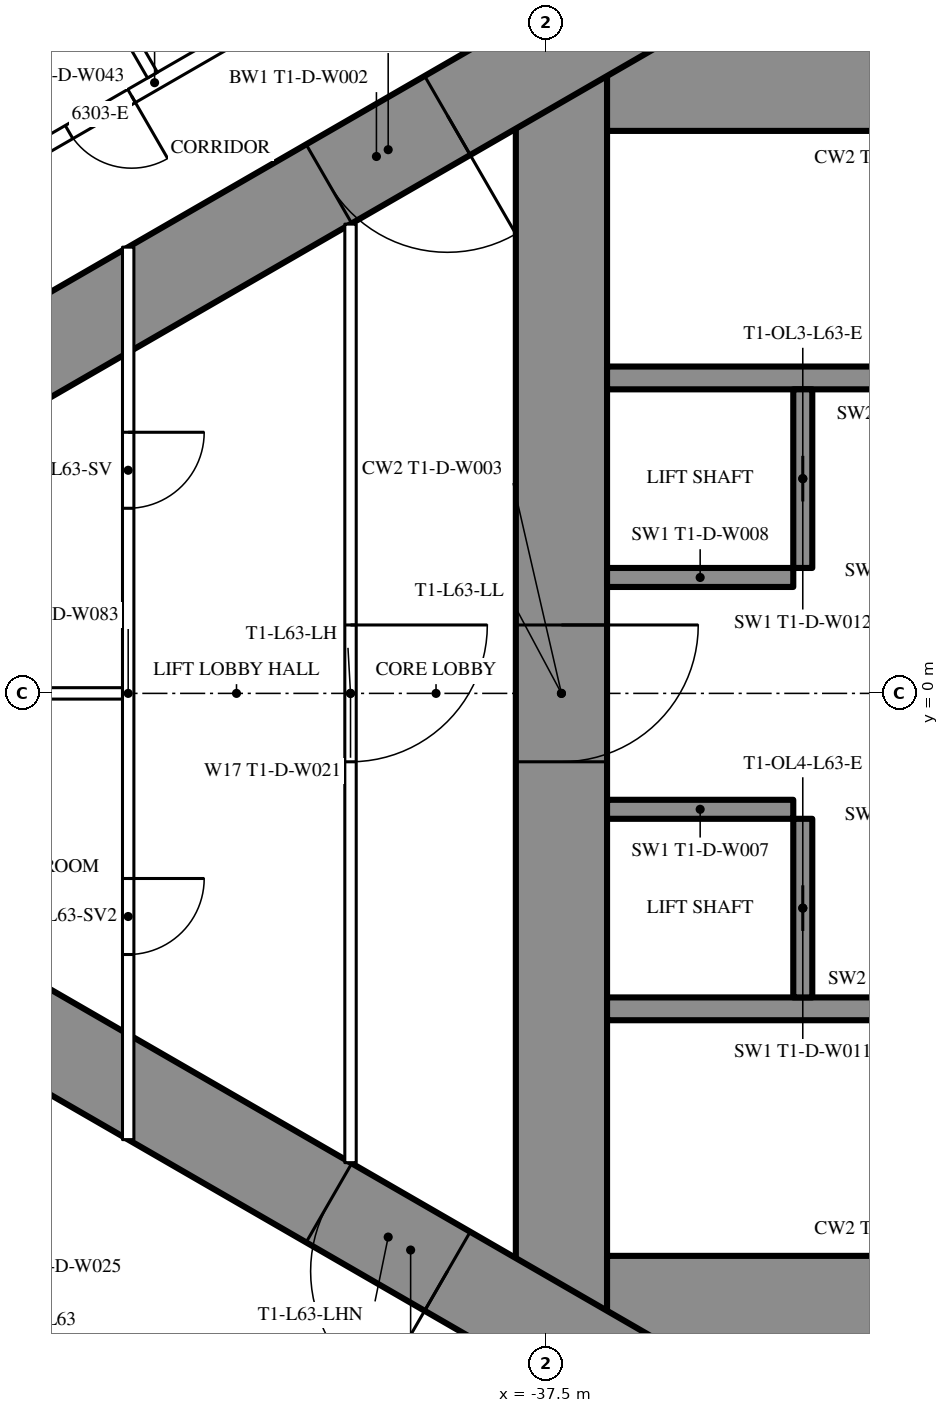
"""IFC4 building model, lengths in metres.
Left out: names, types, materials, properties, quantities, classifications, styles, units other than length and angle.
Written with IfcOpenShell. Run it as: python <this file> out.ifc"""

import sys

from ifc_helpers import new_model, si_unit, direction, frame, frame_2d, origin, place, context, subcontext, project, spatial, rectangle, extrude, element, fill, save


model = new_model("IFC4")
c1 = context("Model", 3, precision=1e-05, world=origin(), true_north=direction((0.0, 1.0)))
c2 = subcontext(c1, "Body", "Model", "MODEL_VIEW")
j1 = project(units=[si_unit("LENGTHUNIT", "METRE"), si_unit("PLANEANGLEUNIT", "RADIAN")], contexts=[c1])
p1 = place(None, origin())
s1 = spatial("IfcSite", under=j1, at=p1, CompositionType="ELEMENT")
p2 = place(p1, origin())
s2 = spatial("IfcBuilding", under=s1, at=p2, CompositionType="ELEMENT")
p3 = place(p2, frame((0.0, 0.0, 236.9)))
s3 = spatial("IfcBuildingStorey", under=s2, at=p3, CompositionType="ELEMENT", Elevation=236.9)
p4 = place(p3, frame((-37.3, 8.6, 0.0), z_axis=(0.0, 0.0, 1.0), x_axis=(0.0, -1.0, 0.0)))
e1 = element("IfcWall", 1, at=p4, inside=s3, PredefinedType="SHEAR", context=c2, shape_type="SweptSolid", body=[
    extrude(rectangle(XDim=17.2, YDim=1.2, at=frame_2d((8.6, 0.0))), origin(), (0.0, 0.0, 1.0), 3.6),
])
p5 = place(p4, frame((7.7, 0.0, 0.0)))
e2 = element("IfcOpeningElement", 2, at=p5, cuts=e1, PredefinedType="OPENING", context=c2, shape_type="SweptSolid", body=[
    extrude(rectangle(XDim=1.8, YDim=2.2, at=frame_2d((0.9, 1.1))), frame((0.0, 0.61, 0.0), z_axis=(0.0, -1.0, 0.0), x_axis=(1.0, 0.0, 0.0)), (0.0, 0.0, 1.0), 1.22),
])
p6 = place(p3, frame((-28.3, 8.0, 0.0), z_axis=(0.0, 0.0, 1.0), x_axis=(-1.0, 0.0, 0.0)))
e3 = element("IfcWall", 3, at=p6, inside=s3, PredefinedType="SHEAR", context=c2, shape_type="SweptSolid", body=[
    extrude(rectangle(XDim=8.4, YDim=1.2, at=frame_2d((4.2, 0.0))), origin(), (0.0, 0.0, 1.0), 3.6),
])
p7 = place(p6, frame((0.25, 0.0, 0.0)))
e4 = element("IfcOpeningElement", 4, at=p7, cuts=e3, PredefinedType="OPENING", context=c2, shape_type="SweptSolid", body=[
    extrude(rectangle(XDim=1.0, YDim=2.2, at=frame_2d((0.5, 1.1))), frame((0.0, 0.61, 0.0), z_axis=(0.0, -1.0, 0.0), x_axis=(1.0, 0.0, 0.0)), (0.0, 0.0, 1.0), 1.22),
])
p8 = place(p3, frame((-28.3, -8.0, 0.0), z_axis=(0.0, 0.0, 1.0), x_axis=(-1.0, 0.0, 0.0)))
e5 = element("IfcWall", 5, at=p8, inside=s3, PredefinedType="SHEAR", context=c2, shape_type="SweptSolid", body=[
    extrude(rectangle(XDim=8.4, YDim=1.2, at=frame_2d((4.2, 0.0))), origin(), (0.0, 0.0, 1.0), 3.6),
])
p9 = place(p8, frame((0.25, 0.0, 0.0)))
e6 = element("IfcOpeningElement", 6, at=p9, cuts=e5, PredefinedType="OPENING", context=c2, shape_type="SweptSolid", body=[
    extrude(rectangle(XDim=1.0, YDim=2.2, at=frame_2d((0.5, 1.1))), frame((0.0, 0.61, 0.0), z_axis=(0.0, -1.0, 0.0), x_axis=(1.0, 0.0, 0.0)), (0.0, 0.0, 1.0), 1.22),
])
for number, where, z_axis, x_axis in (
    (7, (-28.3, 4.15, 0.0), (0.0, 0.0, 1.0), (-1.0, 0.0, 0.0)),
    (8, (-28.3, -4.15, 0.0), (0.0, 0.0, 1.0), (-1.0, 0.0, 0.0)),
):
    element("IfcWall", number, at=place(p3, frame(where, z_axis=z_axis, x_axis=x_axis)), inside=s3, PredefinedType="SHEAR", context=c2, shape_type="SweptSolid", body=[
        extrude(rectangle(XDim=8.4, YDim=0.3, at=frame_2d((4.2, 0.0))), origin(), (0.0, 0.0, 1.0), 3.6),
    ])
p10 = place(p3, frame((-34.125, 4.0, 0.0), z_axis=(0.0, 0.0, 1.0), x_axis=(0.0, -1.0, 0.0)))
e9 = element("IfcWall", 9, at=p10, inside=s3, PredefinedType="SHEAR", context=c2, shape_type="SweptSolid", body=[
    extrude(rectangle(XDim=2.35, YDim=0.25, at=frame_2d((1.175, 0.0))), origin(), (0.0, 0.0, 1.0), 3.6),
])
p11 = place(p10, frame((0.875, 0.0, 0.0)))
e10 = element("IfcOpeningElement", 10, at=p11, cuts=e9, PredefinedType="OPENING", context=c2, shape_type="SweptSolid", body=[
    extrude(rectangle(XDim=0.6, YDim=2.0, at=frame_2d((0.3, 1.0))), frame((0.0, 0.135, 0.0), z_axis=(0.0, -1.0, 0.0), x_axis=(1.0, 0.0, 0.0)), (0.0, 0.0, 1.0), 0.27),
])
p12 = place(p3, frame((-34.25, 1.525, 0.0), z_axis=(0.0, 0.0, 1.0), x_axis=(-1.0, 0.0, 0.0)))
e11 = element("IfcWall", 11, at=p12, inside=s3, PredefinedType="SHEAR", context=c2, shape_type="SweptSolid", body=[
    extrude(rectangle(XDim=2.45, YDim=0.25, at=frame_2d((1.225, 0.0))), origin(), (0.0, 0.0, 1.0), 3.6),
])
p13 = place(p3, frame((-34.125, -1.65, 0.0), z_axis=(0.0, 0.0, 1.0), x_axis=(0.0, -1.0, 0.0)))
e12 = element("IfcWall", 12, at=p13, inside=s3, PredefinedType="SHEAR", context=c2, shape_type="SweptSolid", body=[
    extrude(rectangle(XDim=2.35, YDim=0.25, at=frame_2d((1.175, 0.0))), origin(), (0.0, 0.0, 1.0), 3.6),
])
p14 = place(p13, frame((0.875, 0.0, 0.0)))
e13 = element("IfcOpeningElement", 13, at=p14, cuts=e12, PredefinedType="OPENING", context=c2, shape_type="SweptSolid", body=[
    extrude(rectangle(XDim=0.6, YDim=2.0, at=frame_2d((0.3, 1.0))), frame((0.0, 0.135, 0.0), z_axis=(0.0, -1.0, 0.0), x_axis=(1.0, 0.0, 0.0)), (0.0, 0.0, 1.0), 0.27),
])
p15 = place(p3, frame((-34.25, -1.525, 0.0), z_axis=(0.0, 0.0, 1.0), x_axis=(-1.0, 0.0, 0.0)))
e14 = element("IfcWall", 14, at=p15, inside=s3, PredefinedType="SHEAR", context=c2, shape_type="SweptSolid", body=[
    extrude(rectangle(XDim=2.45, YDim=0.25, at=frame_2d((1.225, 0.0))), origin(), (0.0, 0.0, 1.0), 3.6),
])
p16 = place(p3, frame((-27.2, 14.3, 0.0), z_axis=(0.0, 0.0, 1.0), x_axis=(-0.866026593062, -0.499997940104, 0.0)))
e15 = element("IfcWall", 15, at=p16, inside=s3, PredefinedType="SHEAR", context=c2, shape_type="SweptSolid", body=[
    extrude(rectangle(XDim=28.946, YDim=1.2, at=frame_2d((14.473, 0.0))), origin(), (0.0, 0.0, 1.0), 3.6),
])
p17 = place(p16, frame((4.6, 0.0, 0.0)))
e16 = element("IfcOpeningElement", 16, at=p17, cuts=e15, PredefinedType="OPENING", context=c2, shape_type="SweptSolid", body=[
    extrude(rectangle(XDim=1.0, YDim=2.2, at=frame_2d((0.5, 1.1))), frame((0.0, 0.61, 0.0), z_axis=(0.0, -1.0, 0.0), x_axis=(1.0, 0.0, 0.0)), (0.0, 0.0, 1.0), 1.22),
])
p18 = place(p16, frame((13.395, 0.0, 0.0)))
e17 = element("IfcOpeningElement", 17, at=p18, cuts=e15, PredefinedType="OPENING", context=c2, shape_type="SweptSolid", body=[
    extrude(rectangle(XDim=1.8, YDim=2.2, at=frame_2d((0.9, 1.1))), frame((0.0, 0.61, 0.0), z_axis=(0.0, -1.0, 0.0), x_axis=(1.0, 0.0, 0.0)), (0.0, 0.0, 1.0), 1.22),
])
p19 = place(p3, frame((-27.2, -14.3, 0.0), z_axis=(0.0, 0.0, 1.0), x_axis=(-0.866024021859, 0.500002393557, 0.0)))
e18 = element("IfcWall", 18, at=p19, inside=s3, PredefinedType="SHEAR", context=c2, shape_type="SweptSolid", body=[
    extrude(rectangle(XDim=27.907, YDim=1.2, at=frame_2d((13.954, 0.0))), origin(), (0.0, 0.0, 1.0), 3.6),
])
p20 = place(p19, frame((4.6, 0.0, 0.0)))
e19 = element("IfcOpeningElement", 19, at=p20, cuts=e18, PredefinedType="OPENING", context=c2, shape_type="SweptSolid", body=[
    extrude(rectangle(XDim=1.0, YDim=2.2, at=frame_2d((0.5, 1.1))), frame((0.0, 0.61, 0.0), z_axis=(0.0, -1.0, 0.0), x_axis=(1.0, 0.0, 0.0)), (0.0, 0.0, 1.0), 1.22),
])
p21 = place(p19, frame((13.395, 0.0, 0.0)))
e20 = element("IfcOpeningElement", 20, at=p21, cuts=e18, PredefinedType="OPENING", context=c2, shape_type="SweptSolid", body=[
    extrude(rectangle(XDim=1.8, YDim=2.2, at=frame_2d((0.9, 1.1))), frame((0.0, 0.61, 0.0), z_axis=(0.0, -1.0, 0.0), x_axis=(1.0, 0.0, 0.0)), (0.0, 0.0, 1.0), 1.22),
])
p22 = place(p3, frame((-28.737, 16.068, 0.0), z_axis=(0.0, 0.0, 1.0), x_axis=(-0.866026057212, -0.499998868229, 0.0)))
e21 = element("IfcWall", 21, at=p22, inside=s3, PredefinedType="PARTITIONING", context=c2, shape_type="SweptSolid", body=[
    extrude(rectangle(XDim=32.137, YDim=0.2, at=frame_2d((16.068, 0.0))), origin(), (0.0, 0.0, 1.0), 3.35),
])
p23 = place(p22, frame((1.08, 0.0, 0.0)))
e22 = element("IfcOpeningElement", 22, at=p23, cuts=e21, PredefinedType="OPENING", context=c2, shape_type="SweptSolid", body=[
    extrude(rectangle(XDim=1.8, YDim=2.03, at=frame_2d((0.9, 1.015))), frame((0.0, 0.11, 0.0), z_axis=(0.0, -1.0, 0.0), x_axis=(1.0, 0.0, 0.0)), (0.0, 0.0, 1.0), 0.22),
])
p24 = place(p22, frame((6.86, 0.0, 0.0)))
e23 = element("IfcOpeningElement", 23, at=p24, cuts=e21, PredefinedType="OPENING", context=c2, shape_type="SweptSolid", body=[
    extrude(rectangle(XDim=1.0, YDim=2.2, at=frame_2d((0.5, 1.1))), frame((0.0, 0.11, 0.0), z_axis=(0.0, -1.0, 0.0), x_axis=(1.0, 0.0, 0.0)), (0.0, 0.0, 1.0), 0.22),
])
p25 = place(p22, frame((16.418, 0.0, 0.0)))
e24 = element("IfcOpeningElement", 24, at=p25, cuts=e21, PredefinedType="OPENING", context=c2, shape_type="SweptSolid", body=[
    extrude(rectangle(XDim=0.95, YDim=2.2, at=frame_2d((0.475, 1.1))), frame((0.0, 0.11, 0.0), z_axis=(0.0, -1.0, 0.0), x_axis=(1.0, 0.0, 0.0)), (0.0, 0.0, 1.0), 0.22),
])
p26 = place(p22, frame((20.567, 0.0, 0.0)))
e25 = element("IfcOpeningElement", 25, at=p26, cuts=e21, PredefinedType="OPENING", context=c2, shape_type="SweptSolid", body=[
    extrude(rectangle(XDim=0.95, YDim=2.2, at=frame_2d((0.475, 1.1))), frame((0.0, 0.11, 0.0), z_axis=(0.0, -1.0, 0.0), x_axis=(1.0, 0.0, 0.0)), (0.0, 0.0, 1.0), 0.22),
])
p27 = place(p22, frame((27.065, 0.0, 0.0)))
e26 = element("IfcOpeningElement", 26, at=p27, cuts=e21, PredefinedType="OPENING", context=c2, shape_type="SweptSolid", body=[
    extrude(rectangle(XDim=0.95, YDim=2.2, at=frame_2d((0.475, 1.1))), frame((0.0, 0.11, 0.0), z_axis=(0.0, -1.0, 0.0), x_axis=(1.0, 0.0, 0.0)), (0.0, 0.0, 1.0), 0.22),
])
p28 = place(p3, frame((-42.68, 8.134, 0.0), z_axis=(0.0, 0.0, 1.0), x_axis=(-0.499984479505, 0.866034364361, 0.0)))
e27 = element("IfcWall", 27, at=p28, inside=s3, PredefinedType="PARTITIONING", context=c2, shape_type="SweptSolid", body=[
    extrude(rectangle(XDim=5.995, YDim=0.15, at=frame_2d((2.998, 0.0))), origin(), (0.0, 0.0, 1.0), 2.45),
])
p29 = place(p3, frame((-43.445, 9.309, 0.0), z_axis=(0.0, 0.0, 1.0), x_axis=(-0.866031185235, -0.4999899861, 0.0)))
e28 = element("IfcWall", 28, at=p29, inside=s3, PredefinedType="PARTITIONING", context=c2, shape_type="SweptSolid", body=[
    extrude(rectangle(XDim=2.475, YDim=0.15, at=frame_2d((1.238, 0.0))), origin(), (0.0, 0.0, 1.0), 3.35),
])
p30 = place(p3, frame((-40.075, 6.174, 0.0), z_axis=(0.0, 0.0, 1.0), x_axis=(0.0, -1.0, 0.0)))
e29 = element("IfcWall", 29, at=p30, inside=s3, PredefinedType="PARTITIONING", context=c2, shape_type="SweptSolid", body=[
    extrude(rectangle(XDim=12.348, YDim=0.15, at=frame_2d((6.174, 0.0))), origin(), (0.0, 0.0, 1.0), 3.35),
])
p31 = place(p30, frame((5.274, 0.0, 0.0)))
e30 = element("IfcOpeningElement", 30, at=p31, cuts=e29, PredefinedType="OPENING", context=c2, shape_type="SweptSolid", body=[
    extrude(rectangle(XDim=1.8, YDim=2.2, at=frame_2d((0.9, 1.1))), frame((0.0, 0.085, 0.0), z_axis=(0.0, -1.0, 0.0), x_axis=(1.0, 0.0, 0.0)), (0.0, 0.0, 1.0), 0.17),
])
p32 = place(p3, frame((-43.0, 5.871, 0.0), z_axis=(0.0, 0.0, 1.0), x_axis=(0.0, -1.0, 0.0)))
e31 = element("IfcWall", 31, at=p32, inside=s3, PredefinedType="PARTITIONING", context=c2, shape_type="SweptSolid", body=[
    extrude(rectangle(XDim=11.741, YDim=0.15, at=frame_2d((5.871, 0.0))), origin(), (0.0, 0.0, 1.0), 3.35),
])
p33 = place(p32, frame((2.435, 0.0, 0.0)))
e32 = element("IfcOpeningElement", 32, at=p33, cuts=e31, PredefinedType="OPENING", context=c2, shape_type="SweptSolid", body=[
    extrude(rectangle(XDim=1.0, YDim=2.2, at=frame_2d((0.5, 1.1))), frame((0.0, 0.085, 0.0), z_axis=(0.0, -1.0, 0.0), x_axis=(1.0, 0.0, 0.0)), (0.0, 0.0, 1.0), 0.17),
])
p34 = place(p32, frame((8.306, 0.0, 0.0)))
e33 = element("IfcOpeningElement", 33, at=p34, cuts=e31, PredefinedType="OPENING", context=c2, shape_type="SweptSolid", body=[
    extrude(rectangle(XDim=1.0, YDim=2.2, at=frame_2d((0.5, 1.1))), frame((0.0, 0.085, 0.0), z_axis=(0.0, -1.0, 0.0), x_axis=(1.0, 0.0, 0.0)), (0.0, 0.0, 1.0), 0.17),
])
p35 = place(p3, frame((-43.075, 0.0, 0.0), z_axis=(0.0, 0.0, 1.0), x_axis=(-1.0, 0.0, 0.0)))
e34 = element("IfcWall", 34, at=p35, inside=s3, PredefinedType="PARTITIONING", context=c2, shape_type="SweptSolid", body=[
    extrude(rectangle(XDim=10.093, YDim=0.15, at=frame_2d((5.047, 0.0))), origin(), (0.0, 0.0, 1.0), 2.45),
])
p36 = place(p3, frame((-39.758, -11.697, 0.0), z_axis=(0.0, 0.0, 1.0), x_axis=(-0.866024194504, 0.500002094529, 0.0)))
e35 = element("IfcWall", 35, at=p36, inside=s3, PredefinedType="PARTITIONING", context=c2, shape_type="SweptSolid", body=[
    extrude(rectangle(XDim=6.6, YDim=0.25, at=frame_2d((3.3, 0.0))), origin(), (0.0, 0.0, 1.0), 3.35),
])
p37 = place(p36, frame((0.75, 0.0, 0.0)))
e36 = element("IfcOpeningElement", 36, at=p37, cuts=e35, PredefinedType="OPENING", context=c2, shape_type="SweptSolid", body=[
    extrude(rectangle(XDim=1.1, YDim=2.2, at=frame_2d((0.55, 1.1))), frame((0.0, 0.135, 0.0), z_axis=(0.0, -1.0, 0.0), x_axis=(1.0, 0.0, 0.0)), (0.0, 0.0, 1.0), 0.27),
])
p38 = place(p36, frame((2.75, 0.0, 0.0)))
e37 = element("IfcOpeningElement", 37, at=p38, cuts=e35, PredefinedType="OPENING", context=c2, shape_type="SweptSolid", body=[
    extrude(rectangle(XDim=1.1, YDim=2.2, at=frame_2d((0.55, 1.1))), frame((0.0, 0.135, 0.0), z_axis=(0.0, -1.0, 0.0), x_axis=(1.0, 0.0, 0.0)), (0.0, 0.0, 1.0), 0.27),
])
p39 = place(p36, frame((4.75, 0.0, 0.0)))
e38 = element("IfcOpeningElement", 38, at=p39, cuts=e35, PredefinedType="OPENING", context=c2, shape_type="SweptSolid", body=[
    extrude(rectangle(XDim=1.1, YDim=2.2, at=frame_2d((0.55, 1.1))), frame((0.0, 0.135, 0.0), z_axis=(0.0, -1.0, 0.0), x_axis=(1.0, 0.0, 0.0)), (0.0, 0.0, 1.0), 0.27),
])
p40 = place(p25, origin())
e39 = element("IfcDoor", 39, at=p40, inside=s3, OperationType="SINGLE_SWING_LEFT", PredefinedType="DOOR", context=c2, shape_type="SweptSolid", body=[
    extrude(rectangle(XDim=0.95, YDim=2.2, at=frame_2d((0.475, 1.1))), frame((0.0, 0.025, 0.0), z_axis=(0.0, -1.0, 0.0), x_axis=(1.0, 0.0, 0.0)), (0.0, 0.0, 1.0), 0.05),
])
fill(e24, e39)
p41 = place(p31, origin())
e40 = element("IfcDoor", 40, at=p41, inside=s3, OperationType="DOUBLE_DOOR_SINGLE_SWING", PredefinedType="DOOR", context=c2, shape_type="SweptSolid", body=[
    extrude(rectangle(XDim=1.8, YDim=2.2, at=frame_2d((0.9, 1.1))), frame((0.0, 0.025, 0.0), z_axis=(0.0, -1.0, 0.0), x_axis=(1.0, 0.0, 0.0)), (0.0, 0.0, 1.0), 0.05),
])
fill(e30, e40)
p42 = place(p33, origin())
e41 = element("IfcDoor", 41, at=p42, inside=s3, OperationType="SINGLE_SWING_LEFT", PredefinedType="DOOR", context=c2, shape_type="SweptSolid", body=[
    extrude(rectangle(XDim=1.0, YDim=2.2, at=frame_2d((0.5, 1.1))), frame((0.0, 0.025, 0.0), z_axis=(0.0, -1.0, 0.0), x_axis=(1.0, 0.0, 0.0)), (0.0, 0.0, 1.0), 0.05),
])
fill(e32, e41)
p43 = place(p34, origin())
e42 = element("IfcDoor", 42, at=p43, inside=s3, OperationType="SINGLE_SWING_LEFT", PredefinedType="DOOR", context=c2, shape_type="SweptSolid", body=[
    extrude(rectangle(XDim=1.0, YDim=2.2, at=frame_2d((0.5, 1.1))), frame((0.0, 0.025, 0.0), z_axis=(0.0, -1.0, 0.0), x_axis=(1.0, 0.0, 0.0)), (0.0, 0.0, 1.0), 0.05),
])
fill(e33, e42)
p44 = place(p18, origin())
e43 = element("IfcDoor", 43, at=p44, inside=s3, OperationType="DOUBLE_DOOR_SINGLE_SWING", PredefinedType="DOOR", context=c2, shape_type="SweptSolid", body=[
    extrude(rectangle(XDim=1.8, YDim=2.2, at=frame_2d((0.9, 1.1))), frame((0.0, 0.025, 0.0), z_axis=(0.0, -1.0, 0.0), x_axis=(1.0, 0.0, 0.0)), (0.0, 0.0, 1.0), 0.05),
])
fill(e17, e43)
p45 = place(p21, origin())
e44 = element("IfcDoor", 44, at=p45, inside=s3, OperationType="DOUBLE_DOOR_SINGLE_SWING", PredefinedType="DOOR", context=c2, shape_type="SweptSolid", body=[
    extrude(rectangle(XDim=1.8, YDim=2.2, at=frame_2d((0.9, 1.1))), frame((0.0, 0.025, 0.0), z_axis=(0.0, -1.0, 0.0), x_axis=(1.0, 0.0, 0.0)), (0.0, 0.0, 1.0), 0.05),
])
fill(e20, e44)
p46 = place(p5, origin())
e45 = element("IfcDoor", 45, at=p46, inside=s3, OperationType="DOUBLE_DOOR_SINGLE_SWING", PredefinedType="DOOR", context=c2, shape_type="SweptSolid", body=[
    extrude(rectangle(XDim=1.8, YDim=2.2, at=frame_2d((0.9, 1.1))), frame((0.0, 0.025, 0.0), z_axis=(0.0, -1.0, 0.0), x_axis=(1.0, 0.0, 0.0)), (0.0, 0.0, 1.0), 0.05),
])
fill(e2, e45)
p47 = place(p11, origin())
e46 = element("IfcDoor", 46, at=p47, inside=s3, OperationType="SLIDING_TO_LEFT", PredefinedType="DOOR", context=c2, shape_type="SweptSolid", body=[
    extrude(rectangle(XDim=0.6, YDim=2.0, at=frame_2d((0.3, 1.0))), frame((0.0, 0.025, 0.0), z_axis=(0.0, -1.0, 0.0), x_axis=(1.0, 0.0, 0.0)), (0.0, 0.0, 1.0), 0.05),
])
fill(e10, e46)
p48 = place(p14, origin())
e47 = element("IfcDoor", 47, at=p48, inside=s3, OperationType="SLIDING_TO_LEFT", PredefinedType="DOOR", context=c2, shape_type="SweptSolid", body=[
    extrude(rectangle(XDim=0.6, YDim=2.0, at=frame_2d((0.3, 1.0))), frame((0.0, 0.025, 0.0), z_axis=(0.0, -1.0, 0.0), x_axis=(1.0, 0.0, 0.0)), (0.0, 0.0, 1.0), 0.05),
])
fill(e13, e47)
save(model, sys.argv[1])
